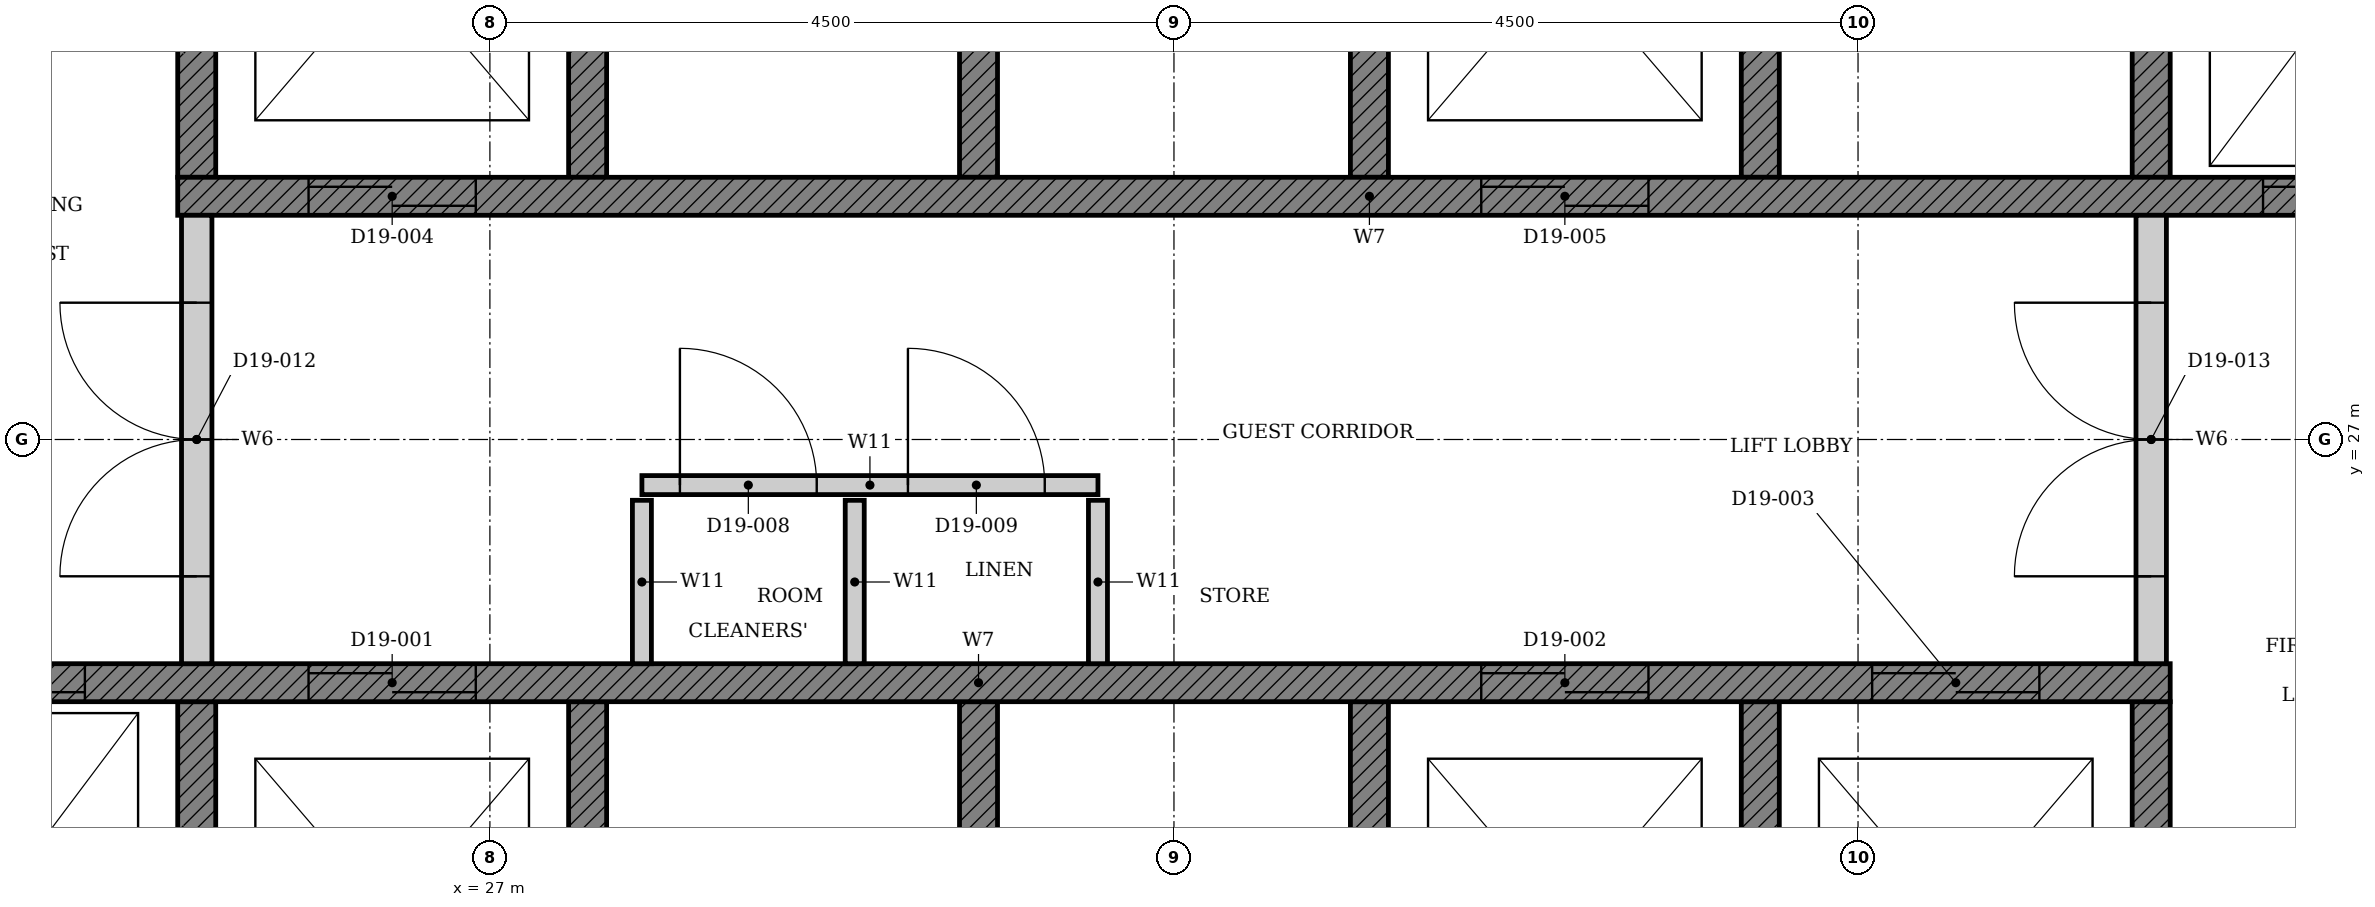
"""IFC4 building model, lengths in metres.
Left out: names, types, materials, properties, quantities, classifications, styles, units other than length and angle.
Written with IfcOpenShell. Run it as: python <this file> out.ifc"""

import sys

from ifc_helpers import new_model, si_unit, direction, frame, frame_2d, origin, place, context, subcontext, project, spatial, polyline, rectangle, outline, extrude, element, fill, save


model = new_model("IFC4")
c1 = context("Model", 3, precision=1e-05, world=origin(), true_north=direction((0.0, 1.0)))
c2 = subcontext(c1, "Body", "Model", "MODEL_VIEW")
j1 = project(units=[si_unit("LENGTHUNIT", "METRE"), si_unit("PLANEANGLEUNIT", "RADIAN")], contexts=[c1])
p1 = place(None, origin())
s1 = spatial("IfcSite", under=j1, at=p1, CompositionType="ELEMENT")
p2 = place(p1, origin())
s2 = spatial("IfcBuilding", under=s1, at=p2, CompositionType="ELEMENT")
p3 = place(p2, frame((0.0, 0.0, 81.6)))
s3 = spatial("IfcBuildingStorey", under=s2, at=p3, CompositionType="ELEMENT", Elevation=81.6)
p4 = place(p3, origin())
e1 = element("IfcWall", 1, at=p4, inside=s3, PredefinedType="SHEAR", context=c2, shape_type="SweptSolid", body=[
    extrude(outline(polyline([(22.375, 22.35), (38.053, 22.35), (38.053, 25.275), (37.803, 25.275), (37.803, 22.65), (35.482, 22.65), (35.482, 25.275), (35.232, 25.275), (35.232, 22.65), (32.911, 22.65), (32.911, 25.275), (32.661, 25.275), (32.661, 22.65), (30.339, 22.65), (30.339, 25.275), (30.089, 25.275), (30.089, 22.65), (27.768, 22.65), (27.768, 25.275), (27.518, 25.275), (27.518, 22.65), (25.197, 22.65), (25.197, 25.275), (24.947, 25.275), (24.947, 22.65), (22.625, 22.65), (22.625, 25.275), (22.375, 25.275), (22.375, 22.35)])), origin(), (0.0, 0.0, 1.0), 3.3),
])
p5 = place(p3, origin())
e2 = element("IfcWall", 2, at=p5, inside=s3, PredefinedType="SHEAR", context=c2, shape_type="SweptSolid", body=[
    extrude(outline(polyline([(24.947, 28.725), (25.197, 28.725), (25.197, 31.35), (27.518, 31.35), (27.518, 28.725), (27.768, 28.725), (27.768, 31.35), (30.089, 31.35), (30.089, 28.725), (30.339, 28.725), (30.339, 31.35), (32.661, 31.35), (32.661, 28.725), (32.911, 28.725), (32.911, 31.35), (35.232, 31.35), (35.232, 28.725), (35.482, 28.725), (35.482, 31.35), (37.803, 31.35), (37.803, 28.725), (38.053, 28.725), (38.053, 31.35), (40.375, 31.35), (40.375, 28.725), (40.625, 28.725), (40.625, 31.65), (24.947, 31.65), (24.947, 28.725)])), origin(), (0.0, 0.0, 1.0), 3.3),
])
p6 = place(p3, frame((22.375, 25.4, 0.0), z_axis=(0.0, 0.0, 1.0), x_axis=(1.0, 0.0, 0.0)))
e3 = element("IfcWall", 3, at=p6, inside=s3, PredefinedType="SHEAR", context=c2, shape_type="SweptSolid", body=[
    extrude(rectangle(XDim=15.678, YDim=0.25, at=frame_2d((7.839, 0.0))), origin(), (0.0, 0.0, 1.0), 3.3),
])
p7 = place(p6, frame((3.432, 0.0, 0.0)))
e4 = element("IfcOpeningElement", 4, at=p7, cuts=e3, PredefinedType="OPENING", context=c2, shape_type="SweptSolid", body=[
    extrude(rectangle(XDim=1.1, YDim=2.1, at=frame_2d((0.55, 1.05))), frame((0.0, 0.135, 0.0), z_axis=(0.0, -1.0, 0.0), x_axis=(1.0, 0.0, 0.0)), (0.0, 0.0, 1.0), 0.27),
])
p8 = place(p6, frame((11.146, 0.0, 0.0)))
e5 = element("IfcOpeningElement", 5, at=p8, cuts=e3, PredefinedType="OPENING", context=c2, shape_type="SweptSolid", body=[
    extrude(rectangle(XDim=1.1, YDim=2.1, at=frame_2d((0.55, 1.05))), frame((0.0, 0.135, 0.0), z_axis=(0.0, -1.0, 0.0), x_axis=(1.0, 0.0, 0.0)), (0.0, 0.0, 1.0), 0.27),
])
p9 = place(p6, frame((13.718, 0.0, 0.0)))
e6 = element("IfcOpeningElement", 6, at=p9, cuts=e3, PredefinedType="OPENING", context=c2, shape_type="SweptSolid", body=[
    extrude(rectangle(XDim=1.1, YDim=2.1, at=frame_2d((0.55, 1.05))), frame((0.0, 0.135, 0.0), z_axis=(0.0, -1.0, 0.0), x_axis=(1.0, 0.0, 0.0)), (0.0, 0.0, 1.0), 0.27),
])
p10 = place(p6, frame((0.861, 0.0, 0.0)))
e7 = element("IfcOpeningElement", 7, at=p10, cuts=e3, PredefinedType="OPENING", context=c2, shape_type="SweptSolid", body=[
    extrude(rectangle(XDim=1.1, YDim=2.1, at=frame_2d((0.55, 1.05))), frame((0.0, 0.135, 0.0), z_axis=(0.0, -1.0, 0.0), x_axis=(1.0, 0.0, 0.0)), (0.0, 0.0, 1.0), 0.27),
])
p11 = place(p3, frame((24.947, 28.6, 0.0), z_axis=(0.0, 0.0, 1.0), x_axis=(1.0, 0.0, 0.0)))
e8 = element("IfcWall", 8, at=p11, inside=s3, PredefinedType="SHEAR", context=c2, shape_type="SweptSolid", body=[
    extrude(rectangle(XDim=15.678, YDim=0.25, at=frame_2d((7.839, 0.0))), origin(), (0.0, 0.0, 1.0), 3.3),
])
p12 = place(p11, frame((0.861, 0.0, 0.0)))
e9 = element("IfcOpeningElement", 9, at=p12, cuts=e8, PredefinedType="OPENING", context=c2, shape_type="SweptSolid", body=[
    extrude(rectangle(XDim=1.1, YDim=2.1, at=frame_2d((0.55, 1.05))), frame((0.0, 0.135, 0.0), z_axis=(0.0, -1.0, 0.0), x_axis=(1.0, 0.0, 0.0)), (0.0, 0.0, 1.0), 0.27),
])
p13 = place(p11, frame((8.575, 0.0, 0.0)))
e10 = element("IfcOpeningElement", 10, at=p13, cuts=e8, PredefinedType="OPENING", context=c2, shape_type="SweptSolid", body=[
    extrude(rectangle(XDim=1.1, YDim=2.1, at=frame_2d((0.55, 1.05))), frame((0.0, 0.135, 0.0), z_axis=(0.0, -1.0, 0.0), x_axis=(1.0, 0.0, 0.0)), (0.0, 0.0, 1.0), 0.27),
])
p14 = place(p11, frame((13.718, 0.0, 0.0)))
e11 = element("IfcOpeningElement", 11, at=p14, cuts=e8, PredefinedType="OPENING", context=c2, shape_type="SweptSolid", body=[
    extrude(rectangle(XDim=1.1, YDim=2.1, at=frame_2d((0.55, 1.05))), frame((0.0, 0.135, 0.0), z_axis=(0.0, -1.0, 0.0), x_axis=(1.0, 0.0, 0.0)), (0.0, 0.0, 1.0), 0.27),
])
p15 = place(p3, frame((28.0, 26.7, 0.0), z_axis=(0.0, 0.0, 1.0), x_axis=(1.0, 0.0, 0.0)))
e12 = element("IfcWall", 12, at=p15, inside=s3, PredefinedType="PARTITIONING", context=c2, shape_type="SweptSolid", body=[
    extrude(rectangle(XDim=3.0, YDim=0.125, at=frame_2d((1.5, 0.0))), origin(), (0.0, 0.0, 1.0), 3.3),
])
p16 = place(p15, frame((0.25, 0.0, 0.0)))
e13 = element("IfcOpeningElement", 13, at=p16, cuts=e12, PredefinedType="OPENING", context=c2, shape_type="SweptSolid", body=[
    extrude(rectangle(XDim=0.9, YDim=2.1, at=frame_2d((0.45, 1.05))), frame((0.0, 0.073, 0.0), z_axis=(0.0, -1.0, 0.0), x_axis=(1.0, 0.0, 0.0)), (0.0, 0.0, 1.0), 0.145),
])
p17 = place(p15, frame((1.75, 0.0, 0.0)))
e14 = element("IfcOpeningElement", 14, at=p17, cuts=e12, PredefinedType="OPENING", context=c2, shape_type="SweptSolid", body=[
    extrude(rectangle(XDim=0.9, YDim=2.1, at=frame_2d((0.45, 1.05))), frame((0.0, 0.073, 0.0), z_axis=(0.0, -1.0, 0.0), x_axis=(1.0, 0.0, 0.0)), (0.0, 0.0, 1.0), 0.145),
])
for number, where, z_axis, x_axis in (
    (15, (28.0, 25.525, 0.0), (0.0, 0.0, 1.0), (0.0, 1.0, 0.0)),
    (16, (29.4, 25.525, 0.0), (0.0, 0.0, 1.0), (0.0, 1.0, 0.0)),
    (17, (31.0, 25.525, 0.0), (0.0, 0.0, 1.0), (0.0, 1.0, 0.0)),
):
    element("IfcWall", number, at=place(p3, frame(where, z_axis=z_axis, x_axis=x_axis)), inside=s3, PredefinedType="PARTITIONING", context=c2, shape_type="SweptSolid", body=[
        extrude(rectangle(XDim=1.075, YDim=0.125, at=frame_2d((0.538, 0.0))), origin(), (0.0, 0.0, 1.0), 3.3),
    ])
p18 = place(p3, frame((25.072, 25.525, 0.0), z_axis=(0.0, 0.0, 1.0), x_axis=(0.0, 1.0, 0.0)))
e18 = element("IfcWall", 18, at=p18, inside=s3, PredefinedType="PARTITIONING", context=c2, shape_type="SweptSolid", body=[
    extrude(rectangle(XDim=2.95, YDim=0.2, at=frame_2d((1.475, 0.0))), origin(), (0.0, 0.0, 1.0), 3.3),
])
p19 = place(p18, frame((0.575, 0.0, 0.0)))
e19 = element("IfcOpeningElement", 19, at=p19, cuts=e18, PredefinedType="OPENING", context=c2, shape_type="SweptSolid", body=[
    extrude(rectangle(XDim=1.8, YDim=2.1, at=frame_2d((0.9, 1.05))), frame((0.0, 0.11, 0.0), z_axis=(0.0, -1.0, 0.0), x_axis=(1.0, 0.0, 0.0)), (0.0, 0.0, 1.0), 0.22),
])
p20 = place(p3, frame((37.928, 25.525, 0.0), z_axis=(0.0, 0.0, 1.0), x_axis=(0.0, 1.0, 0.0)))
e20 = element("IfcWall", 20, at=p20, inside=s3, PredefinedType="PARTITIONING", context=c2, shape_type="SweptSolid", body=[
    extrude(rectangle(XDim=2.95, YDim=0.2, at=frame_2d((1.475, 0.0))), origin(), (0.0, 0.0, 1.0), 3.3),
])
p21 = place(p20, frame((0.575, 0.0, 0.0)))
e21 = element("IfcOpeningElement", 21, at=p21, cuts=e20, PredefinedType="OPENING", context=c2, shape_type="SweptSolid", body=[
    extrude(rectangle(XDim=1.8, YDim=2.1, at=frame_2d((0.9, 1.05))), frame((0.0, 0.11, 0.0), z_axis=(0.0, -1.0, 0.0), x_axis=(1.0, 0.0, 0.0)), (0.0, 0.0, 1.0), 0.22),
])
p22 = place(p7, origin())
e22 = element("IfcDoor", 22, at=p22, inside=s3, OperationType="DOUBLE_DOOR_SLIDING", PredefinedType="DOOR", context=c2, shape_type="SweptSolid", body=[
    extrude(rectangle(XDim=1.1, YDim=2.1, at=frame_2d((0.55, 1.05))), frame((0.0, 0.025, 0.0), z_axis=(0.0, -1.0, 0.0), x_axis=(1.0, 0.0, 0.0)), (0.0, 0.0, 1.0), 0.05),
])
fill(e4, e22)
p23 = place(p8, origin())
e23 = element("IfcDoor", 23, at=p23, inside=s3, OperationType="DOUBLE_DOOR_SLIDING", PredefinedType="DOOR", context=c2, shape_type="SweptSolid", body=[
    extrude(rectangle(XDim=1.1, YDim=2.1, at=frame_2d((0.55, 1.05))), frame((0.0, 0.025, 0.0), z_axis=(0.0, -1.0, 0.0), x_axis=(1.0, 0.0, 0.0)), (0.0, 0.0, 1.0), 0.05),
])
fill(e5, e23)
p24 = place(p9, origin())
e24 = element("IfcDoor", 24, at=p24, inside=s3, OperationType="DOUBLE_DOOR_SLIDING", PredefinedType="DOOR", context=c2, shape_type="SweptSolid", body=[
    extrude(rectangle(XDim=1.1, YDim=2.1, at=frame_2d((0.55, 1.05))), frame((0.0, 0.025, 0.0), z_axis=(0.0, -1.0, 0.0), x_axis=(1.0, 0.0, 0.0)), (0.0, 0.0, 1.0), 0.05),
])
fill(e6, e24)
p25 = place(p12, origin())
e25 = element("IfcDoor", 25, at=p25, inside=s3, OperationType="DOUBLE_DOOR_SLIDING", PredefinedType="DOOR", context=c2, shape_type="SweptSolid", body=[
    extrude(rectangle(XDim=1.1, YDim=2.1, at=frame_2d((0.55, 1.05))), frame((0.0, 0.025, 0.0), z_axis=(0.0, -1.0, 0.0), x_axis=(1.0, 0.0, 0.0)), (0.0, 0.0, 1.0), 0.05),
])
fill(e9, e25)
p26 = place(p13, origin())
e26 = element("IfcDoor", 26, at=p26, inside=s3, OperationType="DOUBLE_DOOR_SLIDING", PredefinedType="DOOR", context=c2, shape_type="SweptSolid", body=[
    extrude(rectangle(XDim=1.1, YDim=2.1, at=frame_2d((0.55, 1.05))), frame((0.0, 0.025, 0.0), z_axis=(0.0, -1.0, 0.0), x_axis=(1.0, 0.0, 0.0)), (0.0, 0.0, 1.0), 0.05),
])
fill(e10, e26)
p27 = place(p10, origin())
e27 = element("IfcDoor", 27, at=p27, inside=s3, OperationType="DOUBLE_DOOR_SLIDING", PredefinedType="DOOR", context=c2, shape_type="SweptSolid", body=[
    extrude(rectangle(XDim=1.1, YDim=2.1, at=frame_2d((0.55, 1.05))), frame((0.0, 0.025, 0.0), z_axis=(0.0, -1.0, 0.0), x_axis=(1.0, 0.0, 0.0)), (0.0, 0.0, 1.0), 0.05),
])
fill(e7, e27)
p28 = place(p14, origin())
e28 = element("IfcDoor", 28, at=p28, inside=s3, OperationType="DOUBLE_DOOR_SLIDING", PredefinedType="DOOR", context=c2, shape_type="SweptSolid", body=[
    extrude(rectangle(XDim=1.1, YDim=2.1, at=frame_2d((0.55, 1.05))), frame((0.0, 0.025, 0.0), z_axis=(0.0, -1.0, 0.0), x_axis=(1.0, 0.0, 0.0)), (0.0, 0.0, 1.0), 0.05),
])
fill(e11, e28)
p29 = place(p16, origin())
e29 = element("IfcDoor", 29, at=p29, inside=s3, OperationType="SINGLE_SWING_LEFT", PredefinedType="DOOR", context=c2, shape_type="SweptSolid", body=[
    extrude(rectangle(XDim=0.9, YDim=2.1, at=frame_2d((0.45, 1.05))), frame((0.0, 0.025, 0.0), z_axis=(0.0, -1.0, 0.0), x_axis=(1.0, 0.0, 0.0)), (0.0, 0.0, 1.0), 0.05),
])
fill(e13, e29)
p30 = place(p17, origin())
e30 = element("IfcDoor", 30, at=p30, inside=s3, OperationType="SINGLE_SWING_LEFT", PredefinedType="DOOR", context=c2, shape_type="SweptSolid", body=[
    extrude(rectangle(XDim=0.9, YDim=2.1, at=frame_2d((0.45, 1.05))), frame((0.0, 0.025, 0.0), z_axis=(0.0, -1.0, 0.0), x_axis=(1.0, 0.0, 0.0)), (0.0, 0.0, 1.0), 0.05),
])
fill(e14, e30)
p31 = place(p19, origin())
e31 = element("IfcDoor", 31, at=p31, inside=s3, OperationType="DOUBLE_DOOR_SINGLE_SWING", PredefinedType="DOOR", context=c2, shape_type="SweptSolid", body=[
    extrude(rectangle(XDim=1.8, YDim=2.1, at=frame_2d((0.9, 1.05))), frame((0.0, 0.025, 0.0), z_axis=(0.0, -1.0, 0.0), x_axis=(1.0, 0.0, 0.0)), (0.0, 0.0, 1.0), 0.05),
])
fill(e19, e31)
p32 = place(p21, origin())
e32 = element("IfcDoor", 32, at=p32, inside=s3, OperationType="DOUBLE_DOOR_SINGLE_SWING", PredefinedType="DOOR", context=c2, shape_type="SweptSolid", body=[
    extrude(rectangle(XDim=1.8, YDim=2.1, at=frame_2d((0.9, 1.05))), frame((0.0, 0.025, 0.0), z_axis=(0.0, -1.0, 0.0), x_axis=(1.0, 0.0, 0.0)), (0.0, 0.0, 1.0), 0.05),
])
fill(e21, e32)
save(model, sys.argv[1])
